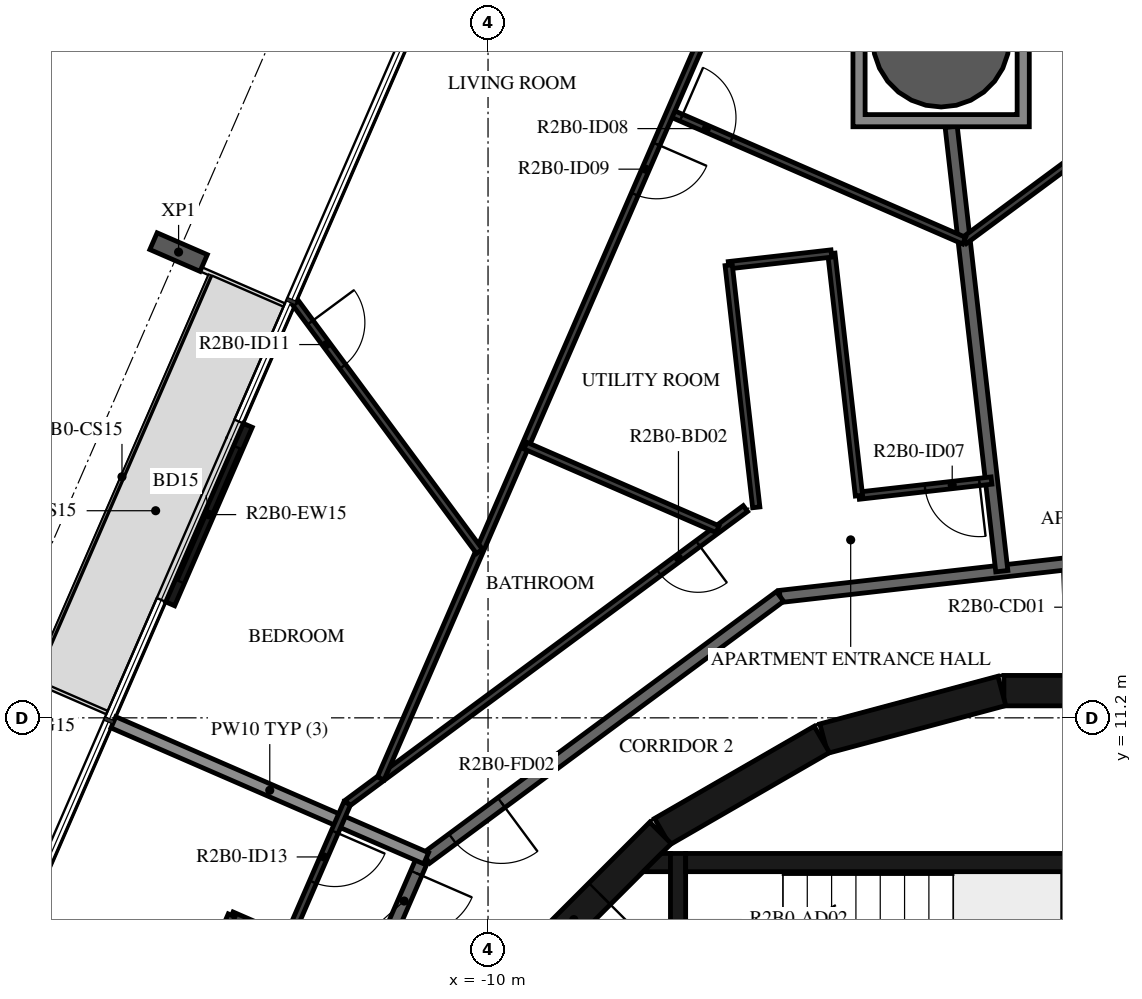
"""IFC4 building model, lengths in metres.
Left out: names, types, materials, properties, quantities, classifications, styles, units other than length and angle.
Written with IfcOpenShell. Run it as: python <this file> out.ifc"""

import sys

from ifc_helpers import new_model, si_unit, direction, frame, frame_2d, origin, origin_2d, place, context, subcontext, project, spatial, polyline, rectangle, hollow_circle, i_section, outline, extrude, element, fill, save


model = new_model("IFC4")
c1 = context("Model", 3, precision=1e-05, world=origin(), true_north=direction((0.0, 1.0)))
c2 = subcontext(c1, "Body", "Model", "MODEL_VIEW")
j1 = project(units=[si_unit("LENGTHUNIT", "METRE"), si_unit("PLANEANGLEUNIT", "RADIAN")], contexts=[c1])
p1 = place(None, origin())
s1 = spatial("IfcSite", under=j1, at=p1, CompositionType="ELEMENT")
p2 = place(p1, origin())
s2 = spatial("IfcBuilding", under=s1, at=p2, CompositionType="ELEMENT")
p3 = place(p2, frame((0.0, 0.0, 90.7)))
s3 = spatial("IfcBuildingStorey", under=s2, at=p3, CompositionType="ELEMENT", Elevation=90.7)
p4 = place(p3, frame((-2.549, 22.37, -0.38), z_axis=(0.0, 0.0, 1.0), x_axis=(1.0, 0.0, 0.0)))
e1 = element("IfcColumn", 1, at=p4, inside=s3, PredefinedType="COLUMN", context=c2, shape_type="SweptSolid", body=[
    extrude(hollow_circle(Radius=1.125, WallThickness=0.055, at=origin_2d()), origin(), (0.0, 0.0, 1.0), 3.5),
])
p5 = place(p3, frame((-15.089, 18.859, -0.38), z_axis=(0.0, 0.0, 1.0), x_axis=(0.398749038162, 0.917060087761, 0.0)))
e2 = element("IfcColumn", 2, at=p5, inside=s3, PredefinedType="COLUMN", context=c2, shape_type="SweptSolid", body=[
    extrude(i_section(OverallWidth=0.3, OverallDepth=0.9, WebThickness=0.019, FlangeThickness=0.035, FilletRadius=0.03, at=origin_2d()), origin(), (0.0, 0.0, 1.0), 3.5),
])
p6 = place(p3, frame((-13.951, 16.01, 0.0), z_axis=(0.0, 0.0, 1.0), x_axis=(-0.398720531764, -0.917072482168, 0.0)))
e3 = element("IfcWall", 3, at=p6, inside=s3, PredefinedType="STANDARD", context=c2, shape_type="SweptSolid", body=[
    extrude(rectangle(XDim=3.2, YDim=0.16, at=frame_2d((1.6, 0.0))), origin(), (0.0, 0.0, 1.0), 3.12),
])
p7 = place(p6, frame((0.4, 0.0, 0.0)))
e4 = element("IfcOpeningElement", 4, at=p7, cuts=e3, PredefinedType="OPENING", context=c2, shape_type="SweptSolid", body=[
    extrude(rectangle(XDim=2.4, YDim=2.4, at=frame_2d((1.2, 1.2))), frame((0.0, 0.09, 0.0), z_axis=(0.0, -1.0, 0.0), x_axis=(1.0, 0.0, 0.0)), (0.0, 0.0, 1.0), 0.18),
])
for number, where, z_axis, x_axis in (
    (5, (1.516, 11.647, 0.0), (0.0, 0.0, 1.0), (-1.0, 0.0, 0.0)),
    (6, (-1.55, 11.643, 0.0), (0.0, 0.0, 1.0), (-0.966, -0.259, 0.0)),
    (7, (-4.51, 10.845, 0.0), (0.0, 0.0, 1.0), (-0.866, -0.5, 0.0)),
):
    element("IfcWall", number, at=place(p3, frame(where, z_axis=z_axis, x_axis=x_axis)), inside=s3, PredefinedType="SHEAR", context=c2, shape_type="SweptSolid", body=[
        extrude(rectangle(XDim=3.033, YDim=0.5, at=frame_2d((1.516, 0.0))), origin(), (0.0, 0.0, 1.0), 3.12),
    ])
p8 = place(p3, frame((-7.164, 9.308, 0.0), z_axis=(0.0, 0.0, 1.0), x_axis=(-0.707106781187, -0.707106781187, 0.0)))
e8 = element("IfcWall", 8, at=p8, inside=s3, PredefinedType="SHEAR", context=c2, shape_type="SweptSolid", body=[
    extrude(rectangle(XDim=3.032, YDim=0.5, at=frame_2d((1.516, 0.0))), origin(), (0.0, 0.0, 1.0), 3.12),
])
p9 = place(p8, frame((1.416, 0.0, 0.0)))
e9 = element("IfcOpeningElement", 9, at=p9, cuts=e8, PredefinedType="OPENING", context=c2, shape_type="SweptSolid", body=[
    extrude(rectangle(XDim=1.2, YDim=2.1, at=frame_2d((0.6, 1.05))), frame((0.0, 0.26, 0.0), z_axis=(0.0, -1.0, 0.0), x_axis=(1.0, 0.0, 0.0)), (0.0, 0.0, 1.0), 0.52),
])
p10 = place(p3, frame((-6.75, 8.82, 0.0), z_axis=(0.0, 0.0, 1.0), x_axis=(1.0, 0.0, 0.0)))
e10 = element("IfcWall", 10, at=p10, inside=s3, PredefinedType="SHEAR", context=c2, shape_type="SweptSolid", body=[
    extrude(rectangle(XDim=6.75, YDim=0.3, at=frame_2d((3.375, 0.0))), origin(), (0.0, 0.0, 1.0), 3.12),
])
p11 = place(p3, frame((-6.875, 8.97, 0.0), z_axis=(0.0, 0.0, 1.0), x_axis=(0.0, -1.0, 0.0)))
e11 = element("IfcWall", 11, at=p11, inside=s3, PredefinedType="SHEAR", context=c2, shape_type="SweptSolid", body=[
    extrude(rectangle(XDim=3.92, YDim=0.25, at=frame_2d((1.96, 0.0))), origin(), (0.0, 0.0, 1.0), 3.12),
])
p12 = place(p11, frame((1.61, 0.0, 0.0)))
e12 = element("IfcOpeningElement", 12, at=p12, cuts=e11, PredefinedType="OPENING", context=c2, shape_type="SweptSolid", body=[
    extrude(rectangle(XDim=1.2, YDim=2.1, at=frame_2d((0.6, 1.05))), frame((0.0, 0.135, 0.0), z_axis=(0.0, -1.0, 0.0), x_axis=(1.0, 0.0, 0.0)), (0.0, 0.0, 1.0), 0.27),
])
p13 = place(p3, origin())
e13 = element("IfcWall", 13, at=p13, inside=s3, PredefinedType="SHEAR", context=c2, shape_type="SweptSolid", body=[
    extrude(outline(polyline([(-7.148, 8.97), (-7.0, 8.97), (-7.0, 8.67), (-7.448, 8.67), (-7.148, 8.97)])), origin(), (0.0, 0.0, 1.0), 3.12),
])
p14 = place(p3, frame((2.096, 14.028, 0.0), z_axis=(0.0, 0.0, 1.0), x_axis=(-0.993569170114, -0.113226782163, 0.0)))
e14 = element("IfcWall", 14, at=p14, inside=s3, PredefinedType="STANDARD", context=c2, shape_type="SweptSolid", body=[
    extrude(rectangle(XDim=7.342, YDim=0.2, at=frame_2d((3.671, 0.0))), origin(), (0.0, 0.0, 1.0), 3.12),
])
p15 = place(p3, frame((-5.198, 13.196, 0.0), z_axis=(0.0, 0.0, 1.0), x_axis=(-0.803864151363, -0.594812933748, 0.0)))
e15 = element("IfcWall", 15, at=p15, inside=s3, PredefinedType="STANDARD", context=c2, shape_type="SweptSolid", body=[
    extrude(rectangle(XDim=7.24, YDim=0.2, at=frame_2d((3.62, 0.0))), origin(), (0.0, 0.0, 1.0), 3.12),
])
p16 = place(p15, frame((5.7, 0.0, 0.0)))
e16 = element("IfcOpeningElement", 16, at=p16, cuts=e15, PredefinedType="OPENING", context=c2, shape_type="SweptSolid", body=[
    extrude(rectangle(XDim=1.0, YDim=2.1, at=frame_2d((0.5, 1.05))), frame((0.0, 0.11, 0.0), z_axis=(0.0, -1.0, 0.0), x_axis=(1.0, 0.0, 0.0)), (0.0, 0.0, 1.0), 0.22),
])
p17 = place(p3, frame((-11.1, 8.829, 0.0), z_axis=(0.0, 0.0, 1.0), x_axis=(-0.398741918631, -0.917063183388, 0.0)))
e17 = element("IfcWall", 17, at=p17, inside=s3, PredefinedType="STANDARD", context=c2, shape_type="SweptSolid", body=[
    extrude(rectangle(XDim=7.342, YDim=0.2, at=frame_2d((3.671, 0.0))), origin(), (0.0, 0.0, 1.0), 3.12),
])
p18 = place(p17, frame((0.2, 0.0, 0.0)))
e18 = element("IfcOpeningElement", 18, at=p18, cuts=e17, PredefinedType="OPENING", context=c2, shape_type="SweptSolid", body=[
    extrude(rectangle(XDim=1.0, YDim=2.1, at=frame_2d((0.5, 1.05))), frame((0.0, 0.11, 0.0), z_axis=(0.0, -1.0, 0.0), x_axis=(1.0, 0.0, 0.0)), (0.0, 0.0, 1.0), 0.22),
])
p19 = place(p3, frame((-2.384, 20.92, 0.0), z_axis=(0.0, 0.0, 1.0), x_axis=(0.113210540889, -0.993571020829, 0.0)))
e19 = element("IfcWall", 19, at=p19, inside=s3, PredefinedType="STANDARD", context=c2, shape_type="SweptSolid", body=[
    extrude(rectangle(XDim=7.356, YDim=0.2, at=frame_2d((3.678, 0.0))), origin(), (0.0, 0.0, 1.0), 3.12),
])
p20 = place(p3, frame((-16.161, 11.126, 0.0), z_axis=(0.0, 0.0, 1.0), x_axis=(0.917063135481, -0.398742028813, 0.0)))
e20 = element("IfcWall", 20, at=p20, inside=s3, PredefinedType="STANDARD", context=c2, shape_type="SweptSolid", body=[
    extrude(rectangle(XDim=5.608, YDim=0.2, at=frame_2d((2.804, 0.0))), origin(), (0.0, 0.0, 1.0), 2.73),
])
p21 = place(p3, frame((2.068, 22.183, 0.0), z_axis=(0.0, 0.0, 1.0), x_axis=(-0.803867138365, -0.594808896921, 0.0)))
e21 = element("IfcWall", 21, at=p21, inside=s3, PredefinedType="PARTITIONING", context=c2, shape_type="SweptSolid", body=[
    extrude(rectangle(XDim=5.273, YDim=0.12, at=frame_2d((2.636, 0.0))), origin(), (0.0, 0.0, 1.0), 3.12),
])
p22 = place(p21, frame((0.2, 0.0, 0.0)))
e22 = element("IfcOpeningElement", 22, at=p22, cuts=e21, PredefinedType="OPENING", context=c2, shape_type="SweptSolid", body=[
    extrude(rectangle(XDim=0.9, YDim=2.1, at=frame_2d((0.45, 1.05))), frame((0.0, 0.07, 0.0), z_axis=(0.0, -1.0, 0.0), x_axis=(1.0, 0.0, 0.0)), (0.0, 0.0, 1.0), 0.14),
])
p23 = place(p3, frame((-1.721, 15.102, 0.0), z_axis=(0.0, 0.0, 1.0), x_axis=(-0.993571720958, -0.11320439617, 0.0)))
e23 = element("IfcWall", 23, at=p23, inside=s3, PredefinedType="PARTITIONING", context=c2, shape_type="SweptSolid", body=[
    extrude(rectangle(XDim=2.193, YDim=0.12, at=frame_2d((1.097, 0.0))), origin(), (0.0, 0.0, 1.0), 3.12),
])
p24 = place(p23, frame((0.2, 0.0, 0.0)))
e24 = element("IfcOpeningElement", 24, at=p24, cuts=e23, PredefinedType="OPENING", context=c2, shape_type="SweptSolid", body=[
    extrude(rectangle(XDim=0.9, YDim=2.1, at=frame_2d((0.45, 1.05))), frame((0.0, 0.07, 0.0), z_axis=(0.0, -1.0, 0.0), x_axis=(1.0, 0.0, 0.0)), (0.0, 0.0, 1.0), 0.14),
])
p25 = place(p3, frame((-3.9, 14.854, 0.0), z_axis=(0.0, 0.0, 1.0), x_axis=(-0.113178937308, 0.993574621329, 0.0)))
e25 = element("IfcWall", 25, at=p25, inside=s3, PredefinedType="PARTITIONING", context=c2, shape_type="SweptSolid", body=[
    extrude(rectangle(XDim=4.008, YDim=0.12, at=frame_2d((2.004, 0.0))), origin(), (0.0, 0.0, 1.0), 3.12),
])
p26 = place(p3, frame((-4.354, 18.836, 0.0), z_axis=(0.0, 0.0, 1.0), x_axis=(-0.99355903199, -0.113315709199, 0.0)))
e26 = element("IfcWall", 26, at=p26, inside=s3, PredefinedType="PARTITIONING", context=c2, shape_type="SweptSolid", body=[
    extrude(rectangle(XDim=1.7, YDim=0.12, at=frame_2d((0.85, 0.0))), origin(), (0.0, 0.0, 1.0), 3.12),
])
p27 = place(p3, frame((-6.042, 18.644, 0.0), z_axis=(0.0, 0.0, 1.0), x_axis=(0.113185787648, -0.993573840977, 0.0)))
e27 = element("IfcWall", 27, at=p27, inside=s3, PredefinedType="PARTITIONING", context=c2, shape_type="SweptSolid", body=[
    extrude(rectangle(XDim=4.008, YDim=0.12, at=frame_2d((2.004, 0.0))), origin(), (0.0, 0.0, 1.0), 3.12),
])
p28 = place(p3, frame((-5.767, 14.641, 0.0), z_axis=(0.0, 0.0, 1.0), x_axis=(-0.803853364238, -0.594827511807, 0.0)))
e28 = element("IfcWall", 28, at=p28, inside=s3, PredefinedType="PARTITIONING", context=c2, shape_type="SweptSolid", body=[
    extrude(rectangle(XDim=8.146, YDim=0.12, at=frame_2d((4.073, 0.0))), origin(), (0.0, 0.0, 1.0), 3.12),
])
p29 = place(p28, frame((0.97, 0.0, 0.0)))
e29 = element("IfcOpeningElement", 29, at=p29, cuts=e28, PredefinedType="OPENING", context=c2, shape_type="SweptSolid", body=[
    extrude(rectangle(XDim=0.8, YDim=2.1, at=frame_2d((0.4, 1.05))), frame((0.0, 0.07, 0.0), z_axis=(0.0, -1.0, 0.0), x_axis=(1.0, 0.0, 0.0)), (0.0, 0.0, 1.0), 0.14),
])
p30 = place(p3, frame((-12.315, 9.796, 0.0), z_axis=(0.0, 0.0, 1.0), x_axis=(-0.398762563957, -0.91705420646, 0.0)))
e30 = element("IfcWall", 30, at=p30, inside=s3, PredefinedType="PARTITIONING", context=c2, shape_type="SweptSolid", body=[
    extrude(rectangle(XDim=2.449, YDim=0.12, at=frame_2d((1.225, 0.0))), origin(), (0.0, 0.0, 1.0), 3.12),
])
p31 = place(p30, frame((0.513, 0.0, 0.0)))
e31 = element("IfcOpeningElement", 31, at=p31, cuts=e30, PredefinedType="OPENING", context=c2, shape_type="SweptSolid", body=[
    extrude(rectangle(XDim=0.9, YDim=2.1, at=frame_2d((0.45, 1.05))), frame((0.0, 0.07, 0.0), z_axis=(0.0, -1.0, 0.0), x_axis=(1.0, 0.0, 0.0)), (0.0, 0.0, 1.0), 0.14),
])
p32 = place(p3, frame((-7.005, 21.149, 0.0), z_axis=(0.0, 0.0, 1.0), x_axis=(0.917050915224, -0.398770132891, 0.0)))
e32 = element("IfcWall", 32, at=p32, inside=s3, PredefinedType="PARTITIONING", context=c2, shape_type="SweptSolid", body=[
    extrude(rectangle(XDim=5.272, YDim=0.12, at=frame_2d((2.636, 0.0))), origin(), (0.0, 0.0, 1.0), 3.12),
])
p33 = place(p32, frame((0.2, 0.0, 0.0)))
e33 = element("IfcOpeningElement", 33, at=p33, cuts=e32, PredefinedType="OPENING", context=c2, shape_type="SweptSolid", body=[
    extrude(rectangle(XDim=0.9, YDim=2.1, at=frame_2d((0.45, 1.05))), frame((0.0, 0.07, 0.0), z_axis=(0.0, -1.0, 0.0), x_axis=(1.0, 0.0, 0.0)), (0.0, 0.0, 1.0), 0.14),
])
p34 = place(p3, frame((-5.952, 23.571, 0.0), z_axis=(0.0, 0.0, 1.0), x_axis=(-0.398745097158, -0.917061801348, 0.0)))
e34 = element("IfcWall", 34, at=p34, inside=s3, PredefinedType="PARTITIONING", context=c2, shape_type="SweptSolid", body=[
    extrude(rectangle(XDim=14.576, YDim=0.12, at=frame_2d((7.288, 0.0))), origin(), (0.0, 0.0, 1.0), 3.12),
])
p35 = place(p34, frame((3.201, 0.0, 0.0)))
e35 = element("IfcOpeningElement", 35, at=p35, cuts=e34, PredefinedType="OPENING", context=c2, shape_type="SweptSolid", body=[
    extrude(rectangle(XDim=0.9, YDim=2.1, at=frame_2d((0.45, 1.05))), frame((0.0, 0.07, 0.0), z_axis=(0.0, -1.0, 0.0), x_axis=(1.0, 0.0, 0.0)), (0.0, 0.0, 1.0), 0.14),
])
p36 = place(p34, frame((0.2, 0.0, 0.0)))
e36 = element("IfcOpeningElement", 36, at=p36, cuts=e34, PredefinedType="OPENING", context=c2, shape_type="SweptSolid", body=[
    extrude(rectangle(XDim=0.9, YDim=2.1, at=frame_2d((0.45, 1.05))), frame((0.0, 0.07, 0.0), z_axis=(0.0, -1.0, 0.0), x_axis=(1.0, 0.0, 0.0)), (0.0, 0.0, 1.0), 0.14),
])
p37 = place(p3, frame((-9.385, 15.676, 0.0), z_axis=(0.0, 0.0, 1.0), x_axis=(0.917068929701, -0.398728702475, 0.0)))
e37 = element("IfcWall", 37, at=p37, inside=s3, PredefinedType="PARTITIONING", context=c2, shape_type="SweptSolid", body=[
    extrude(rectangle(XDim=3.445, YDim=0.12, at=frame_2d((1.723, 0.0))), origin(), (0.0, 0.0, 1.0), 3.12),
])
p38 = place(p3, frame((-13.163, 18.022, 0.0), z_axis=(0.0, 0.0, 1.0), x_axis=(0.594797671626, -0.803875444226, 0.0)))
e38 = element("IfcWall", 38, at=p38, inside=s3, PredefinedType="PARTITIONING", context=c2, shape_type="SweptSolid", body=[
    extrude(rectangle(XDim=5.081, YDim=0.12, at=frame_2d((2.54, 0.0))), origin(), (0.0, 0.0, 1.0), 3.12),
])
p39 = place(p38, frame((0.4, 0.0, 0.0)))
e39 = element("IfcOpeningElement", 39, at=p39, cuts=e38, PredefinedType="OPENING", context=c2, shape_type="SweptSolid", body=[
    extrude(rectangle(XDim=0.9, YDim=2.1, at=frame_2d((0.45, 1.05))), frame((0.0, 0.07, 0.0), z_axis=(0.0, -1.0, 0.0), x_axis=(1.0, 0.0, 0.0)), (0.0, 0.0, 1.0), 0.14),
])
p40 = place(p3, frame((-13.292, 7.55, 0.0), z_axis=(0.0, 0.0, 1.0), x_axis=(-0.917016180017, 0.398850003871, 0.0)))
e40 = element("IfcWall", 40, at=p40, inside=s3, PredefinedType="PARTITIONING", context=c2, shape_type="SweptSolid", body=[
    extrude(rectangle(XDim=1.009, YDim=0.12, at=frame_2d((0.504, 0.0))), origin(), (0.0, 0.0, 1.0), 3.12),
])
p41 = place(p3, frame((-14.217, 7.952, 0.0), z_axis=(0.0, 0.0, 1.0), x_axis=(-0.398722053614, -0.917071820503, 0.0)))
e41 = element("IfcWall", 41, at=p41, inside=s3, PredefinedType="PARTITIONING", context=c2, shape_type="SweptSolid", body=[
    extrude(rectangle(XDim=4.4, YDim=0.12, at=frame_2d((2.2, 0.0))), origin(), (0.0, 0.0, 1.0), 3.12),
])
p42 = place(p3, origin())
e42 = element("IfcWall", 42, at=p42, inside=s3, PredefinedType="STANDARD", context=c2, shape_type="SweptSolid", body=[
    extrude(outline(polyline([(-1.099, 23.82), (-1.099, 20.92), (-3.999, 20.92), (-3.999, 23.82), (-1.099, 23.82)]), holes=[polyline([(-3.799, 21.12), (-1.299, 21.12), (-1.299, 23.62), (-3.799, 23.62), (-3.799, 21.12)])]), origin(), (0.0, 0.0, 1.0), 3.12),
])
p43 = place(p7, origin())
e43 = element("IfcDoor", 43, at=p43, inside=s3, OperationType="DOUBLE_DOOR_SLIDING", PredefinedType="DOOR", context=c2, shape_type="SweptSolid", body=[
    extrude(rectangle(XDim=2.4, YDim=2.4, at=frame_2d((1.2, 1.2))), frame((0.0, 0.025, 0.0), z_axis=(0.0, -1.0, 0.0), x_axis=(1.0, 0.0, 0.0)), (0.0, 0.0, 1.0), 0.05),
])
fill(e4, e43)
p44 = place(p9, origin())
e44 = element("IfcDoor", 44, at=p44, inside=s3, OperationType="SINGLE_SWING_RIGHT", PredefinedType="DOOR", context=c2, shape_type="SweptSolid", body=[
    extrude(rectangle(XDim=1.2, YDim=2.1, at=frame_2d((0.6, 1.05))), frame((0.0, 0.025, 0.0), z_axis=(0.0, -1.0, 0.0), x_axis=(1.0, 0.0, 0.0)), (0.0, 0.0, 1.0), 0.05),
])
fill(e9, e44)
p45 = place(p16, origin())
e45 = element("IfcDoor", 45, at=p45, inside=s3, OperationType="SINGLE_SWING_LEFT", PredefinedType="DOOR", context=c2, shape_type="SweptSolid", body=[
    extrude(rectangle(XDim=1.0, YDim=2.1, at=frame_2d((0.5, 1.05))), frame((0.0, 0.025, 0.0), z_axis=(0.0, -1.0, 0.0), x_axis=(1.0, 0.0, 0.0)), (0.0, 0.0, 1.0), 0.05),
])
fill(e16, e45)
p46 = place(p24, origin())
e46 = element("IfcDoor", 46, at=p46, inside=s3, OperationType="SINGLE_SWING_LEFT", PredefinedType="DOOR", context=c2, shape_type="SweptSolid", body=[
    extrude(rectangle(XDim=0.9, YDim=2.1, at=frame_2d((0.45, 1.05))), frame((0.0, 0.025, 0.0), z_axis=(0.0, -1.0, 0.0), x_axis=(1.0, 0.0, 0.0)), (0.0, 0.0, 1.0), 0.05),
])
fill(e24, e46)
p47 = place(p29, origin())
e47 = element("IfcDoor", 47, at=p47, inside=s3, OperationType="SINGLE_SWING_LEFT", PredefinedType="DOOR", context=c2, shape_type="SweptSolid", body=[
    extrude(rectangle(XDim=0.8, YDim=2.1, at=frame_2d((0.4, 1.05))), frame((0.0, 0.025, 0.0), z_axis=(0.0, -1.0, 0.0), x_axis=(1.0, 0.0, 0.0)), (0.0, 0.0, 1.0), 0.05),
])
fill(e29, e47)
p48 = place(p33, origin())
e48 = element("IfcDoor", 48, at=p48, inside=s3, OperationType="SINGLE_SWING_LEFT", PredefinedType="DOOR", context=c2, shape_type="SweptSolid", body=[
    extrude(rectangle(XDim=0.9, YDim=2.1, at=frame_2d((0.45, 1.05))), frame((0.0, 0.025, 0.0), z_axis=(0.0, -1.0, 0.0), x_axis=(1.0, 0.0, 0.0)), (0.0, 0.0, 1.0), 0.05),
])
fill(e33, e48)
p49 = place(p35, origin())
e49 = element("IfcDoor", 49, at=p49, inside=s3, OperationType="SINGLE_SWING_LEFT", PredefinedType="DOOR", context=c2, shape_type="SweptSolid", body=[
    extrude(rectangle(XDim=0.9, YDim=2.1, at=frame_2d((0.45, 1.05))), frame((0.0, 0.025, 0.0), z_axis=(0.0, -1.0, 0.0), x_axis=(1.0, 0.0, 0.0)), (0.0, 0.0, 1.0), 0.05),
])
fill(e35, e49)
p50 = place(p39, origin())
e50 = element("IfcDoor", 50, at=p50, inside=s3, OperationType="SINGLE_SWING_RIGHT", PredefinedType="DOOR", context=c2, shape_type="SweptSolid", body=[
    extrude(rectangle(XDim=0.9, YDim=2.1, at=frame_2d((0.45, 1.05))), frame((0.0, 0.025, 0.0), z_axis=(0.0, -1.0, 0.0), x_axis=(1.0, 0.0, 0.0)), (0.0, 0.0, 1.0), 0.05),
])
fill(e39, e50)
p51 = place(p18, origin())
e51 = element("IfcDoor", 51, at=p51, inside=s3, OperationType="SINGLE_SWING_LEFT", PredefinedType="DOOR", context=c2, shape_type="SweptSolid", body=[
    extrude(rectangle(XDim=1.0, YDim=2.1, at=frame_2d((0.5, 1.05))), frame((0.0, 0.025, 0.0), z_axis=(0.0, -1.0, 0.0), x_axis=(1.0, 0.0, 0.0)), (0.0, 0.0, 1.0), 0.05),
])
fill(e18, e51)
p52 = place(p31, origin())
e52 = element("IfcDoor", 52, at=p52, inside=s3, OperationType="SINGLE_SWING_LEFT", PredefinedType="DOOR", context=c2, shape_type="SweptSolid", body=[
    extrude(rectangle(XDim=0.9, YDim=2.1, at=frame_2d((0.45, 1.05))), frame((0.0, 0.025, 0.0), z_axis=(0.0, -1.0, 0.0), x_axis=(1.0, 0.0, 0.0)), (0.0, 0.0, 1.0), 0.05),
])
fill(e31, e52)
save(model, sys.argv[1])
